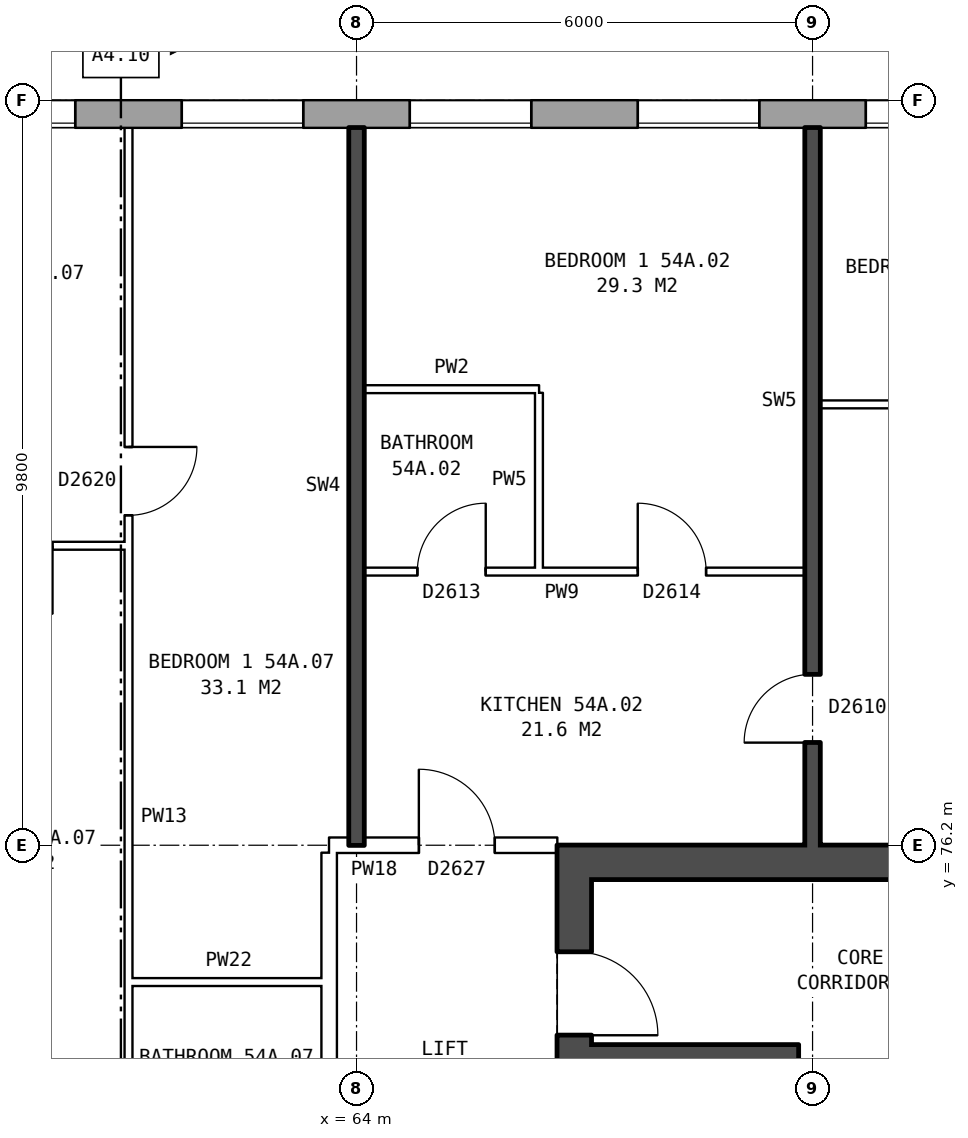
"""IFC4 building model, lengths in metres.
Left out: names, types, materials, properties, quantities, classifications, styles, units other than length and angle.
Written with IfcOpenShell. Run it as: python <this file> out.ifc"""

import sys

from ifc_helpers import new_model, si_unit, direction, frame, frame_2d, origin, place, context, subcontext, project, spatial, rectangle, extrude, element, fill, save


model = new_model("IFC4")
c1 = context("Model", 3, precision=1e-05, world=origin(), true_north=direction((0.0, 1.0)))
c2 = subcontext(c1, "Body", "Model", "MODEL_VIEW")
j1 = project(units=[si_unit("LENGTHUNIT", "METRE"), si_unit("PLANEANGLEUNIT", "RADIAN")], contexts=[c1])
p1 = place(None, origin())
s1 = spatial("IfcSite", under=j1, at=p1, CompositionType="ELEMENT")
p2 = place(p1, origin())
s2 = spatial("IfcBuilding", under=s1, at=p2, CompositionType="ELEMENT")
p3 = place(p2, frame((0.0, 0.0, 191.3)))
s3 = spatial("IfcBuildingStorey", under=s2, at=p3, CompositionType="ELEMENT", Elevation=191.3)
p4 = place(p3, frame((72.925, 85.82, 0.0), z_axis=(0.0, 0.0, 1.0), x_axis=(-1.0, 0.0, 0.0)))
e1 = element("IfcWall", 1, at=p4, inside=s3, PredefinedType="STANDARD", context=c2, shape_type="SweptSolid", body=[
    extrude(rectangle(XDim=39.601, YDim=0.36, at=frame_2d((19.8, 0.0))), origin(), (0.0, 0.0, 1.0), 2.85),
])
p5 = place(p4, frame((0.625, 0.0, 0.8)))
e2 = element("IfcOpeningElement", 2, at=p5, cuts=e1, PredefinedType="OPENING", context=c2, shape_type="SweptSolid", body=[
    extrude(rectangle(XDim=1.6, YDim=1.8, at=frame_2d((0.8, 0.9))), frame((0.0, 0.19, 0.0), z_axis=(0.0, -1.0, 0.0), x_axis=(1.0, 0.0, 0.0)), (0.0, 0.0, 1.0), 0.38),
])
p6 = place(p4, frame((3.625, 0.0, 0.8)))
e3 = element("IfcOpeningElement", 3, at=p6, cuts=e1, PredefinedType="OPENING", context=c2, shape_type="SweptSolid", body=[
    extrude(rectangle(XDim=1.6, YDim=1.8, at=frame_2d((0.8, 0.9))), frame((0.0, 0.19, 0.0), z_axis=(0.0, -1.0, 0.0), x_axis=(1.0, 0.0, 0.0)), (0.0, 0.0, 1.0), 0.38),
])
p7 = place(p4, frame((6.625, 0.0, 0.8)))
e4 = element("IfcOpeningElement", 4, at=p7, cuts=e1, PredefinedType="OPENING", context=c2, shape_type="SweptSolid", body=[
    extrude(rectangle(XDim=1.6, YDim=1.8, at=frame_2d((0.8, 0.9))), frame((0.0, 0.19, 0.0), z_axis=(0.0, -1.0, 0.0), x_axis=(1.0, 0.0, 0.0)), (0.0, 0.0, 1.0), 0.38),
])
p8 = place(p4, frame((9.625, 0.0, 0.8)))
e5 = element("IfcOpeningElement", 5, at=p8, cuts=e1, PredefinedType="OPENING", context=c2, shape_type="SweptSolid", body=[
    extrude(rectangle(XDim=1.6, YDim=1.8, at=frame_2d((0.8, 0.9))), frame((0.0, 0.19, 0.0), z_axis=(0.0, -1.0, 0.0), x_axis=(1.0, 0.0, 0.0)), (0.0, 0.0, 1.0), 0.38),
])
p9 = place(p4, frame((12.625, 0.0, 0.8)))
e6 = element("IfcOpeningElement", 6, at=p9, cuts=e1, PredefinedType="OPENING", context=c2, shape_type="SweptSolid", body=[
    extrude(rectangle(XDim=1.6, YDim=1.8, at=frame_2d((0.8, 0.9))), frame((0.0, 0.19, 0.0), z_axis=(0.0, -1.0, 0.0), x_axis=(1.0, 0.0, 0.0)), (0.0, 0.0, 1.0), 0.38),
])
p10 = place(p4, frame((15.625, 0.0, 0.8)))
e7 = element("IfcOpeningElement", 7, at=p10, cuts=e1, PredefinedType="OPENING", context=c2, shape_type="SweptSolid", body=[
    extrude(rectangle(XDim=1.6, YDim=1.8, at=frame_2d((0.8, 0.9))), frame((0.0, 0.19, 0.0), z_axis=(0.0, -1.0, 0.0), x_axis=(1.0, 0.0, 0.0)), (0.0, 0.0, 1.0), 0.38),
])
p11 = place(p4, frame((18.975, 0.0, 0.15)))
e8 = element("IfcOpeningElement", 8, at=p11, cuts=e1, PredefinedType="OPENING", context=c2, shape_type="SweptSolid", body=[
    extrude(rectangle(XDim=1.6, YDim=1.2, at=frame_2d((0.8, 0.6))), frame((0.0, 0.19, 0.0), z_axis=(0.0, -1.0, 0.0), x_axis=(1.0, 0.0, 0.0)), (0.0, 0.0, 1.0), 0.38),
])
p12 = place(p4, frame((21.375, 0.0, 1.7)))
e9 = element("IfcOpeningElement", 9, at=p12, cuts=e1, PredefinedType="OPENING", context=c2, shape_type="SweptSolid", body=[
    extrude(rectangle(XDim=0.6, YDim=0.9, at=frame_2d((0.3, 0.45))), frame((0.0, 0.19, 0.0), z_axis=(0.0, -1.0, 0.0), x_axis=(1.0, 0.0, 0.0)), (0.0, 0.0, 1.0), 0.38),
])
p13 = place(p4, frame((24.625, 0.0, 0.8)))
e10 = element("IfcOpeningElement", 10, at=p13, cuts=e1, PredefinedType="OPENING", context=c2, shape_type="SweptSolid", body=[
    extrude(rectangle(XDim=1.6, YDim=1.8, at=frame_2d((0.8, 0.9))), frame((0.0, 0.19, 0.0), z_axis=(0.0, -1.0, 0.0), x_axis=(1.0, 0.0, 0.0)), (0.0, 0.0, 1.0), 0.38),
])
p14 = place(p4, frame((27.625, 0.0, 0.8)))
e11 = element("IfcOpeningElement", 11, at=p14, cuts=e1, PredefinedType="OPENING", context=c2, shape_type="SweptSolid", body=[
    extrude(rectangle(XDim=1.6, YDim=1.8, at=frame_2d((0.8, 0.9))), frame((0.0, 0.19, 0.0), z_axis=(0.0, -1.0, 0.0), x_axis=(1.0, 0.0, 0.0)), (0.0, 0.0, 1.0), 0.38),
])
p15 = place(p4, frame((30.625, 0.0, 0.8)))
e12 = element("IfcOpeningElement", 12, at=p15, cuts=e1, PredefinedType="OPENING", context=c2, shape_type="SweptSolid", body=[
    extrude(rectangle(XDim=1.6, YDim=1.8, at=frame_2d((0.8, 0.9))), frame((0.0, 0.19, 0.0), z_axis=(0.0, -1.0, 0.0), x_axis=(1.0, 0.0, 0.0)), (0.0, 0.0, 1.0), 0.38),
])
p16 = place(p4, frame((33.625, 0.0, 0.8)))
e13 = element("IfcOpeningElement", 13, at=p16, cuts=e1, PredefinedType="OPENING", context=c2, shape_type="SweptSolid", body=[
    extrude(rectangle(XDim=1.6, YDim=1.8, at=frame_2d((0.8, 0.9))), frame((0.0, 0.19, 0.0), z_axis=(0.0, -1.0, 0.0), x_axis=(1.0, 0.0, 0.0)), (0.0, 0.0, 1.0), 0.38),
])
p17 = place(p4, frame((36.625, 0.0, 0.8)))
e14 = element("IfcOpeningElement", 14, at=p17, cuts=e1, PredefinedType="OPENING", context=c2, shape_type="SweptSolid", body=[
    extrude(rectangle(XDim=1.6, YDim=1.8, at=frame_2d((0.8, 0.9))), frame((0.0, 0.19, 0.0), z_axis=(0.0, -1.0, 0.0), x_axis=(1.0, 0.0, 0.0)), (0.0, 0.0, 1.0), 0.38),
])
p18 = place(p4, frame((22.275, 0.0, 0.8)))
e15 = element("IfcOpeningElement", 15, at=p18, cuts=e1, PredefinedType="OPENING", context=c2, shape_type="SweptSolid", body=[
    extrude(rectangle(XDim=1.4, YDim=1.8, at=frame_2d((0.7, 0.9))), frame((0.0, 0.19, 0.0), z_axis=(0.0, -1.0, 0.0), x_axis=(1.0, 0.0, 0.0)), (0.0, 0.0, 1.0), 0.38),
])
p19 = place(p3, frame((66.865, 63.8, 0.0), z_axis=(0.0, 0.0, 1.0), x_axis=(0.0, 1.0, 0.0)))
e16 = element("IfcWall", 16, at=p19, inside=s3, PredefinedType="SHEAR", context=c2, shape_type="SweptSolid", body=[
    extrude(rectangle(XDim=12.4, YDim=0.45, at=frame_2d((6.2, 0.0))), origin(), (0.0, 0.0, 1.0), 2.85),
])
p20 = place(p19, frame((1.325, 0.0, 0.0)))
e17 = element("IfcOpeningElement", 17, at=p20, cuts=e16, PredefinedType="OPENING", context=c2, shape_type="SweptSolid", body=[
    extrude(rectangle(XDim=1.1, YDim=2.1, at=frame_2d((0.55, 1.05))), frame((0.0, 0.235, 0.0), z_axis=(0.0, -1.0, 0.0), x_axis=(1.0, 0.0, 0.0)), (0.0, 0.0, 1.0), 0.47),
])
p21 = place(p19, frame((3.6, 0.0, 0.0)))
e18 = element("IfcOpeningElement", 18, at=p21, cuts=e16, PredefinedType="OPENING", context=c2, shape_type="SweptSolid", body=[
    extrude(rectangle(XDim=1.1, YDim=2.1, at=frame_2d((0.55, 1.05))), frame((0.0, 0.235, 0.0), z_axis=(0.0, -1.0, 0.0), x_axis=(1.0, 0.0, 0.0)), (0.0, 0.0, 1.0), 0.47),
])
p22 = place(p19, frame((5.8, 0.0, 0.0)))
e19 = element("IfcOpeningElement", 19, at=p22, cuts=e16, PredefinedType="OPENING", context=c2, shape_type="SweptSolid", body=[
    extrude(rectangle(XDim=1.1, YDim=2.1, at=frame_2d((0.55, 1.05))), frame((0.0, 0.235, 0.0), z_axis=(0.0, -1.0, 0.0), x_axis=(1.0, 0.0, 0.0)), (0.0, 0.0, 1.0), 0.47),
])
p23 = place(p19, frame((8.0, 0.0, 0.0)))
e20 = element("IfcOpeningElement", 20, at=p23, cuts=e16, PredefinedType="OPENING", context=c2, shape_type="SweptSolid", body=[
    extrude(rectangle(XDim=1.1, YDim=2.1, at=frame_2d((0.55, 1.05))), frame((0.0, 0.235, 0.0), z_axis=(0.0, -1.0, 0.0), x_axis=(1.0, 0.0, 0.0)), (0.0, 0.0, 1.0), 0.47),
])
p24 = place(p19, frame((9.9, 0.0, 0.0)))
e21 = element("IfcOpeningElement", 21, at=p24, cuts=e16, PredefinedType="OPENING", context=c2, shape_type="SweptSolid", body=[
    extrude(rectangle(XDim=1.1, YDim=2.1, at=frame_2d((0.55, 1.05))), frame((0.0, 0.235, 0.0), z_axis=(0.0, -1.0, 0.0), x_axis=(1.0, 0.0, 0.0)), (0.0, 0.0, 1.0), 0.47),
])
p25 = place(p3, frame((67.09, 75.975, 0.0), z_axis=(0.0, 0.0, 1.0), x_axis=(1.0, 0.0, 0.0)))
e22 = element("IfcWall", 22, at=p25, inside=s3, PredefinedType="SHEAR", context=c2, shape_type="SweptSolid", body=[
    extrude(rectangle(XDim=8.1, YDim=0.45, at=frame_2d((4.05, 0.0))), origin(), (0.0, 0.0, 1.0), 2.85),
])
p26 = place(p3, frame((67.09, 73.45, 0.0), z_axis=(0.0, 0.0, 1.0), x_axis=(1.0, 0.0, 0.0)))
e23 = element("IfcWall", 23, at=p26, inside=s3, PredefinedType="SHEAR", context=c2, shape_type="SweptSolid", body=[
    extrude(rectangle(XDim=2.475, YDim=0.25, at=frame_2d((1.237, 0.0))), origin(), (0.0, 0.0, 1.0), 2.85),
])
p27 = place(p3, frame((69.69, 66.975, 0.0), z_axis=(0.0, 0.0, 1.0), x_axis=(0.0, 1.0, 0.0)))
e24 = element("IfcWall", 24, at=p27, inside=s3, PredefinedType="SHEAR", context=c2, shape_type="SweptSolid", body=[
    extrude(rectangle(XDim=6.6, YDim=0.25, at=frame_2d((3.3, 0.0))), origin(), (0.0, 0.0, 1.0), 2.85),
])
p28 = place(p3, frame((63.64, 63.9, 0.0), z_axis=(0.0, 0.0, 1.0), x_axis=(0.0, 1.0, 0.0)))
e25 = element("IfcWall", 25, at=p28, inside=s3, PredefinedType="PARTITIONING", context=c2, shape_type="SweptSolid", body=[
    extrude(rectangle(XDim=12.2, YDim=0.2, at=frame_2d((6.1, 0.0))), origin(), (0.0, 0.0, 1.0), 2.85),
])
p29 = place(p28, frame((5.1, 0.0, 0.0)))
e26 = element("IfcOpeningElement", 26, at=p29, cuts=e25, PredefinedType="OPENING", context=c2, shape_type="SweptSolid", body=[
    extrude(rectangle(XDim=2.0, YDim=2.1, at=frame_2d((1.0, 1.05))), frame((0.0, 0.11, 0.0), z_axis=(0.0, -1.0, 0.0), x_axis=(1.0, 0.0, 0.0)), (0.0, 0.0, 1.0), 0.22),
])
p30 = place(p3, frame((61.0, 74.4, 0.0), z_axis=(0.0, 0.0, 1.0), x_axis=(1.0, 0.0, 0.0)))
e27 = element("IfcWall", 27, at=p30, inside=s3, PredefinedType="PARTITIONING", context=c2, shape_type="SweptSolid", body=[
    extrude(rectangle(XDim=2.64, YDim=0.1, at=frame_2d((1.32, 0.0))), origin(), (0.0, 0.0, 1.0), 2.85),
])
p31 = place(p3, frame((63.64, 76.2, 0.0), z_axis=(0.0, 0.0, 1.0), x_axis=(1.0, 0.0, 0.0)))
e28 = element("IfcWall", 28, at=p31, inside=s3, PredefinedType="PARTITIONING", context=c2, shape_type="SweptSolid", body=[
    extrude(rectangle(XDim=3.0, YDim=0.2, at=frame_2d((1.5, 0.0))), origin(), (0.0, 0.0, 1.0), 2.85),
])
p32 = place(p31, frame((1.18, 0.0, 0.0)))
e29 = element("IfcOpeningElement", 29, at=p32, cuts=e28, PredefinedType="OPENING", context=c2, shape_type="SweptSolid", body=[
    extrude(rectangle(XDim=1.0, YDim=2.1, at=frame_2d((0.5, 1.05))), frame((0.0, 0.11, 0.0), z_axis=(0.0, -1.0, 0.0), x_axis=(1.0, 0.0, 0.0)), (0.0, 0.0, 1.0), 0.22),
])
p33 = place(p3, frame((64.1, 79.8, 0.0), z_axis=(0.0, 0.0, 1.0), x_axis=(1.0, 0.0, 0.0)))
e30 = element("IfcWall", 30, at=p33, inside=s3, PredefinedType="PARTITIONING", context=c2, shape_type="SweptSolid", body=[
    extrude(rectangle(XDim=5.8, YDim=0.1, at=frame_2d((2.9, 0.0))), origin(), (0.0, 0.0, 1.0), 2.85),
])
p34 = place(p33, frame((3.6, 0.0, 0.0)))
e31 = element("IfcOpeningElement", 31, at=p34, cuts=e30, PredefinedType="OPENING", context=c2, shape_type="SweptSolid", body=[
    extrude(rectangle(XDim=0.9, YDim=2.1, at=frame_2d((0.45, 1.05))), frame((0.0, 0.06, 0.0), z_axis=(0.0, -1.0, 0.0), x_axis=(1.0, 0.0, 0.0)), (0.0, 0.0, 1.0), 0.12),
])
p35 = place(p33, frame((0.7, 0.0, 0.0)))
e32 = element("IfcOpeningElement", 32, at=p35, cuts=e30, PredefinedType="OPENING", context=c2, shape_type="SweptSolid", body=[
    extrude(rectangle(XDim=0.9, YDim=2.1, at=frame_2d((0.45, 1.05))), frame((0.0, 0.06, 0.0), z_axis=(0.0, -1.0, 0.0), x_axis=(1.0, 0.0, 0.0)), (0.0, 0.0, 1.0), 0.12),
])
p36 = place(p3, frame((58.1, 80.14, 0.0), z_axis=(0.0, 0.0, 1.0), x_axis=(1.0, 0.0, 0.0)))
e33 = element("IfcWall", 33, at=p36, inside=s3, PredefinedType="PARTITIONING", context=c2, shape_type="SweptSolid", body=[
    extrude(rectangle(XDim=2.9, YDim=0.1, at=frame_2d((1.45, 0.0))), origin(), (0.0, 0.0, 1.0), 2.85),
])
p37 = place(p36, frame((1.0, 0.0, 0.0)))
e34 = element("IfcOpeningElement", 34, at=p37, cuts=e33, PredefinedType="OPENING", context=c2, shape_type="SweptSolid", body=[
    extrude(rectangle(XDim=0.9, YDim=2.1, at=frame_2d((0.45, 1.05))), frame((0.0, 0.06, 0.0), z_axis=(0.0, -1.0, 0.0), x_axis=(1.0, 0.0, 0.0)), (0.0, 0.0, 1.0), 0.12),
])
p38 = place(p3, frame((70.1, 82.0, 0.0), z_axis=(0.0, 0.0, 1.0), x_axis=(1.0, 0.0, 0.0)))
e35 = element("IfcWall", 35, at=p38, inside=s3, PredefinedType="PARTITIONING", context=c2, shape_type="SweptSolid", body=[
    extrude(rectangle(XDim=5.54, YDim=0.1, at=frame_2d((2.77, 0.0))), origin(), (0.0, 0.0, 1.0), 2.85),
])
p39 = place(p38, frame((2.32, 0.0, 0.0)))
e36 = element("IfcOpeningElement", 36, at=p39, cuts=e35, PredefinedType="OPENING", context=c2, shape_type="SweptSolid", body=[
    extrude(rectangle(XDim=0.9, YDim=2.1, at=frame_2d((0.45, 1.05))), frame((0.0, 0.06, 0.0), z_axis=(0.0, -1.0, 0.0), x_axis=(1.0, 0.0, 0.0)), (0.0, 0.0, 1.0), 0.12),
])
p40 = place(p3, frame((64.1, 82.2, 0.0), z_axis=(0.0, 0.0, 1.0), x_axis=(1.0, 0.0, 0.0)))
e37 = element("IfcWall", 37, at=p40, inside=s3, PredefinedType="PARTITIONING", context=c2, shape_type="SweptSolid", body=[
    extrude(rectangle(XDim=2.3, YDim=0.1, at=frame_2d((1.15, 0.0))), origin(), (0.0, 0.0, 1.0), 2.85),
])
p41 = place(p3, frame((61.0, 71.3, 0.0), z_axis=(0.0, 0.0, 1.0), x_axis=(0.0, 1.0, 0.0)))
e38 = element("IfcWall", 38, at=p41, inside=s3, PredefinedType="PARTITIONING", context=c2, shape_type="SweptSolid", body=[
    extrude(rectangle(XDim=14.34, YDim=0.1, at=frame_2d((7.17, 0.0))), origin(), (0.0, 0.0, 1.0), 2.85),
])
p42 = place(p41, frame((9.24, 0.0, 0.0)))
e39 = element("IfcOpeningElement", 39, at=p42, cuts=e38, PredefinedType="OPENING", context=c2, shape_type="SweptSolid", body=[
    extrude(rectangle(XDim=0.9, YDim=2.1, at=frame_2d((0.45, 1.05))), frame((0.0, 0.06, 0.0), z_axis=(0.0, -1.0, 0.0), x_axis=(1.0, 0.0, 0.0)), (0.0, 0.0, 1.0), 0.12),
])
p43 = place(p41, frame((0.4, 0.0, 0.0)))
e40 = element("IfcOpeningElement", 40, at=p43, cuts=e38, PredefinedType="OPENING", context=c2, shape_type="SweptSolid", body=[
    extrude(rectangle(XDim=0.9, YDim=2.1, at=frame_2d((0.45, 1.05))), frame((0.0, 0.06, 0.0), z_axis=(0.0, -1.0, 0.0), x_axis=(1.0, 0.0, 0.0)), (0.0, 0.0, 1.0), 0.12),
])
p44 = place(p3, frame((64.0, 76.2, 0.0), z_axis=(0.0, 0.0, 1.0), x_axis=(0.0, 1.0, 0.0)))
e41 = element("IfcWall", 41, at=p44, inside=s3, PredefinedType="SOLIDWALL", context=c2, shape_type="SweptSolid", body=[
    extrude(rectangle(XDim=9.44, YDim=0.2, at=frame_2d((4.72, 0.0))), origin(), (0.0, 0.0, 1.0), 2.85),
])
p45 = place(p3, frame((66.4, 79.85, 0.0), z_axis=(0.0, 0.0, 1.0), x_axis=(0.0, 1.0, 0.0)))
e42 = element("IfcWall", 42, at=p45, inside=s3, PredefinedType="PARTITIONING", context=c2, shape_type="SweptSolid", body=[
    extrude(rectangle(XDim=2.3, YDim=0.1, at=frame_2d((1.15, 0.0))), origin(), (0.0, 0.0, 1.0), 2.85),
])
p46 = place(p3, frame((70.0, 76.2, 0.0), z_axis=(0.0, 0.0, 1.0), x_axis=(0.0, 1.0, 0.0)))
e43 = element("IfcWall", 43, at=p46, inside=s3, PredefinedType="SOLIDWALL", context=c2, shape_type="SweptSolid", body=[
    extrude(rectangle(XDim=9.44, YDim=0.2, at=frame_2d((4.72, 0.0))), origin(), (0.0, 0.0, 1.0), 2.85),
])
p47 = place(p46, frame((1.35, 0.0, 0.0)))
e44 = element("IfcOpeningElement", 44, at=p47, cuts=e43, PredefinedType="OPENING", context=c2, shape_type="SweptSolid", body=[
    extrude(rectangle(XDim=0.9, YDim=2.1, at=frame_2d((0.45, 1.05))), frame((0.0, 0.11, 0.0), z_axis=(0.0, -1.0, 0.0), x_axis=(1.0, 0.0, 0.0)), (0.0, 0.0, 1.0), 0.22),
])
p48 = place(p5, origin())
e45 = element("IfcWindow", 45, at=p48, inside=s3, PartitioningType="SINGLE_PANEL", PredefinedType="WINDOW", context=c2, shape_type="SweptSolid", body=[
    extrude(rectangle(XDim=1.6, YDim=1.8, at=frame_2d((0.8, 0.9))), frame((0.0, 0.15, 0.0), z_axis=(0.0, -1.0, 0.0), x_axis=(1.0, 0.0, 0.0)), (0.0, 0.0, 1.0), 0.06),
])
fill(e2, e45)
p49 = place(p6, origin())
e46 = element("IfcWindow", 46, at=p49, inside=s3, PartitioningType="SINGLE_PANEL", PredefinedType="WINDOW", context=c2, shape_type="SweptSolid", body=[
    extrude(rectangle(XDim=1.6, YDim=1.8, at=frame_2d((0.8, 0.9))), frame((0.0, 0.15, 0.0), z_axis=(0.0, -1.0, 0.0), x_axis=(1.0, 0.0, 0.0)), (0.0, 0.0, 1.0), 0.06),
])
fill(e3, e46)
p50 = place(p7, origin())
e47 = element("IfcWindow", 47, at=p50, inside=s3, PartitioningType="SINGLE_PANEL", PredefinedType="WINDOW", context=c2, shape_type="SweptSolid", body=[
    extrude(rectangle(XDim=1.6, YDim=1.8, at=frame_2d((0.8, 0.9))), frame((0.0, 0.15, 0.0), z_axis=(0.0, -1.0, 0.0), x_axis=(1.0, 0.0, 0.0)), (0.0, 0.0, 1.0), 0.06),
])
fill(e4, e47)
p51 = place(p8, origin())
e48 = element("IfcWindow", 48, at=p51, inside=s3, PartitioningType="SINGLE_PANEL", PredefinedType="WINDOW", context=c2, shape_type="SweptSolid", body=[
    extrude(rectangle(XDim=1.6, YDim=1.8, at=frame_2d((0.8, 0.9))), frame((0.0, 0.15, 0.0), z_axis=(0.0, -1.0, 0.0), x_axis=(1.0, 0.0, 0.0)), (0.0, 0.0, 1.0), 0.06),
])
fill(e5, e48)
p52 = place(p9, origin())
e49 = element("IfcWindow", 49, at=p52, inside=s3, PartitioningType="SINGLE_PANEL", PredefinedType="WINDOW", context=c2, shape_type="SweptSolid", body=[
    extrude(rectangle(XDim=1.6, YDim=1.8, at=frame_2d((0.8, 0.9))), frame((0.0, 0.15, 0.0), z_axis=(0.0, -1.0, 0.0), x_axis=(1.0, 0.0, 0.0)), (0.0, 0.0, 1.0), 0.06),
])
fill(e6, e49)
p53 = place(p24, frame((1.1, 0.0, 0.0), z_axis=(0.0, 0.0, 1.0), x_axis=(-1.0, 0.0, 0.0)))
e50 = element("IfcDoor", 50, at=p53, inside=s3, OperationType="SINGLE_SWING_RIGHT", PredefinedType="DOOR", context=c2, shape_type="SweptSolid", body=[
    extrude(rectangle(XDim=1.1, YDim=2.1, at=frame_2d((0.55, 1.05))), frame((0.0, 0.21, 0.0), z_axis=(0.0, -1.0, 0.0), x_axis=(1.0, 0.0, 0.0)), (0.0, 0.0, 1.0), 0.05),
])
fill(e21, e50)
p54 = place(p34, origin())
e51 = element("IfcDoor", 51, at=p54, inside=s3, OperationType="SINGLE_SWING_LEFT", PredefinedType="DOOR", context=c2, shape_type="SweptSolid", body=[
    extrude(rectangle(XDim=0.9, YDim=2.1, at=frame_2d((0.45, 1.05))), frame((0.0, 0.025, 0.0), z_axis=(0.0, -1.0, 0.0), x_axis=(1.0, 0.0, 0.0)), (0.0, 0.0, 1.0), 0.05),
])
fill(e31, e51)
p55 = place(p32, origin())
e52 = element("IfcDoor", 52, at=p55, inside=s3, OperationType="SINGLE_SWING_LEFT", PredefinedType="DOOR", context=c2, shape_type="SweptSolid", body=[
    extrude(rectangle(XDim=1.0, YDim=2.1, at=frame_2d((0.5, 1.05))), frame((0.0, 0.025, 0.0), z_axis=(0.0, -1.0, 0.0), x_axis=(1.0, 0.0, 0.0)), (0.0, 0.0, 1.0), 0.05),
])
fill(e29, e52)
p56 = place(p47, origin())
e53 = element("IfcDoor", 53, at=p56, inside=s3, OperationType="SINGLE_SWING_LEFT", PredefinedType="DOOR", context=c2, shape_type="SweptSolid", body=[
    extrude(rectangle(XDim=0.9, YDim=2.1, at=frame_2d((0.45, 1.05))), frame((0.0, 0.025, 0.0), z_axis=(0.0, -1.0, 0.0), x_axis=(1.0, 0.0, 0.0)), (0.0, 0.0, 1.0), 0.05),
])
fill(e44, e53)
p57 = place(p35, origin())
e54 = element("IfcDoor", 54, at=p57, inside=s3, OperationType="SINGLE_SWING_RIGHT", PredefinedType="DOOR", context=c2, shape_type="SweptSolid", body=[
    extrude(rectangle(XDim=0.9, YDim=2.1, at=frame_2d((0.45, 1.05))), frame((0.0, 0.025, 0.0), z_axis=(0.0, -1.0, 0.0), x_axis=(1.0, 0.0, 0.0)), (0.0, 0.0, 1.0), 0.05),
])
fill(e32, e54)
p58 = place(p42, frame((0.9, 0.0, 0.0), z_axis=(0.0, 0.0, 1.0), x_axis=(-1.0, 0.0, 0.0)))
e55 = element("IfcDoor", 55, at=p58, inside=s3, OperationType="SINGLE_SWING_LEFT", PredefinedType="DOOR", context=c2, shape_type="SweptSolid", body=[
    extrude(rectangle(XDim=0.9, YDim=2.1, at=frame_2d((0.45, 1.05))), frame((0.0, 0.025, 0.0), z_axis=(0.0, -1.0, 0.0), x_axis=(1.0, 0.0, 0.0)), (0.0, 0.0, 1.0), 0.05),
])
fill(e39, e55)
save(model, sys.argv[1])
